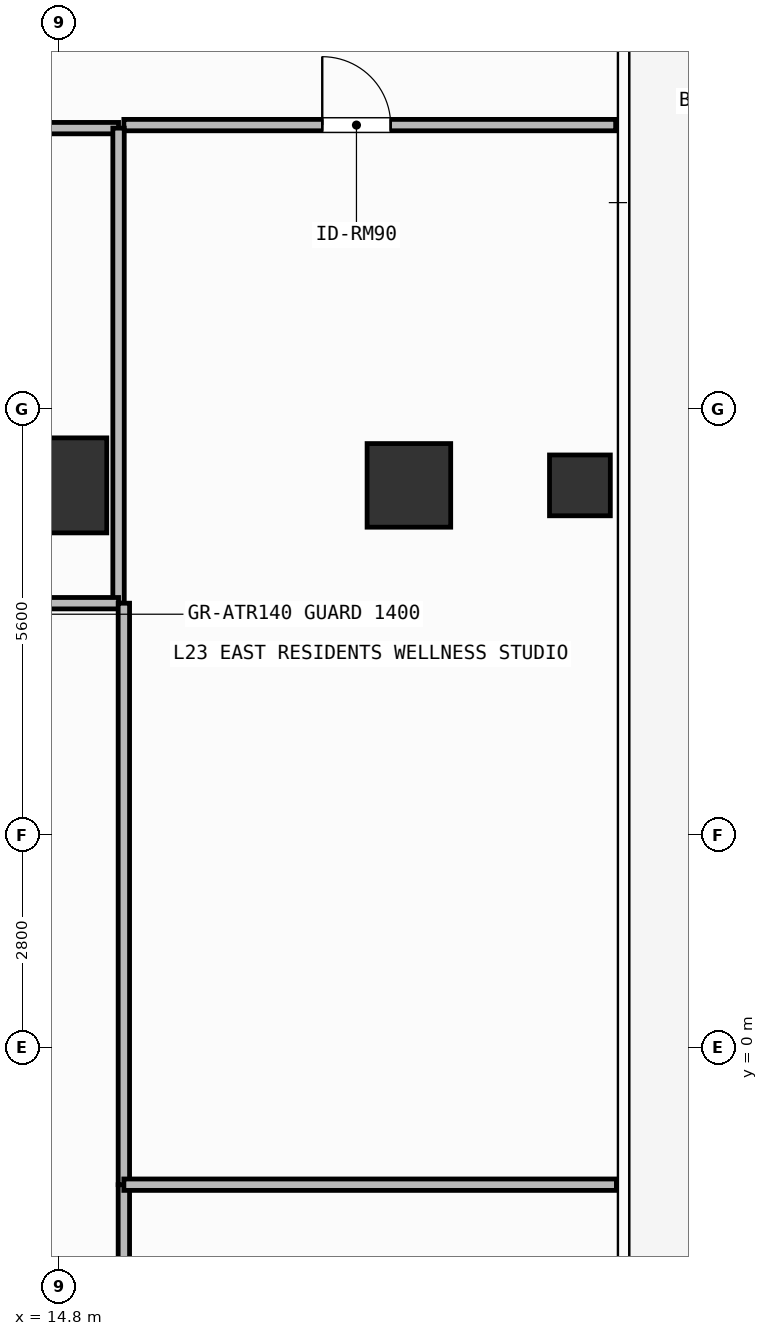
"""IFC4 building model, lengths in metres.
Left out: names, types, materials, properties, quantities, classifications, styles, units other than length and angle.
Written with IfcOpenShell. Run it as: python <this file> out.ifc"""

import sys

from ifc_helpers import new_model, si_unit, direction, frame, frame_2d, origin, origin_2d, place, context, subcontext, project, spatial, rectangle, hollow_rectangle, extrude, element, fill, save


model = new_model("IFC4")
c1 = context("Model", 3, precision=1e-05, world=origin(), true_north=direction((0.0, 1.0)))
c2 = subcontext(c1, "Body", "Model", "MODEL_VIEW")
j1 = project(units=[si_unit("LENGTHUNIT", "METRE"), si_unit("PLANEANGLEUNIT", "RADIAN")], contexts=[c1])
p1 = place(None, origin())
s1 = spatial("IfcSite", under=j1, at=p1, CompositionType="ELEMENT")
p2 = place(p1, origin())
s2 = spatial("IfcBuilding", under=s1, at=p2, CompositionType="ELEMENT")
p3 = place(p2, frame((0.0, 0.0, 93.0)))
s3 = spatial("IfcBuildingStorey", under=s2, at=p3, CompositionType="ELEMENT", Elevation=93.0)
p4 = place(p3, frame((14.8, 7.4, 0.0), z_axis=(0.0, 0.0, 1.0), x_axis=(1.0, 0.0, 0.0)))
e1 = element("IfcColumn", 1, at=p4, inside=s3, PredefinedType="COLUMN", context=c2, shape_type="SweptSolid", body=[
    extrude(rectangle(XDim=1.25, YDim=1.25, at=origin_2d()), origin(), (0.0, 0.0, 1.0), 3.9),
])
p5 = place(p3, frame((19.4, 7.4, 0.0), z_axis=(0.0, 0.0, 1.0), x_axis=(1.0, 0.0, 0.0)))
e2 = element("IfcColumn", 2, at=p5, inside=s3, PredefinedType="COLUMN", context=c2, shape_type="SweptSolid", body=[
    extrude(rectangle(XDim=1.1, YDim=1.1, at=origin_2d()), origin(), (0.0, 0.0, 1.0), 3.9),
])
p6 = place(p3, frame((21.65, 7.4, 0.0), z_axis=(0.0, 0.0, 1.0), x_axis=(1.0, 0.0, 0.0)))
e3 = element("IfcColumn", 3, at=p6, inside=s3, PredefinedType="COLUMN", context=c2, shape_type="SweptSolid", body=[
    extrude(hollow_rectangle(XDim=0.8, YDim=0.8, WallThickness=0.036, at=origin_2d()), origin(), (0.0, 0.0, 1.0), 3.9),
])
p7 = place(p3, frame((8.36, 12.1, 0.0), z_axis=(0.0, 0.0, 1.0), x_axis=(1.0, 0.0, 0.0)))
e4 = element("IfcWall", 4, at=p7, inside=s3, PredefinedType="PARTITIONING", context=c2, shape_type="SweptSolid", body=[
    extrude(rectangle(XDim=7.22, YDim=0.15, at=frame_2d((3.61, 0.0))), origin(), (0.0, 0.0, 1.0), 3.68),
])
p8 = place(p7, frame((3.513, 0.0, 0.0)))
e5 = element("IfcOpeningElement", 5, at=p8, cuts=e4, PredefinedType="OPENING", context=c2, shape_type="SweptSolid", body=[
    extrude(rectangle(XDim=0.9, YDim=2.1, at=frame_2d((0.45, 1.05))), frame((0.0, 0.085, 0.0), z_axis=(0.0, -1.0, 0.0), x_axis=(1.0, 0.0, 0.0)), (0.0, 0.0, 1.0), 0.17),
])
p9 = place(p3, frame((15.65, 12.14, 0.0), z_axis=(0.0, 0.0, 1.0), x_axis=(1.0, 0.0, 0.0)))
e6 = element("IfcWall", 6, at=p9, inside=s3, PredefinedType="PARTITIONING", context=c2, shape_type="SweptSolid", body=[
    extrude(rectangle(XDim=6.47, YDim=0.15, at=frame_2d((3.235, 0.0))), origin(), (0.0, 0.0, 1.0), 3.68),
])
p10 = place(p9, frame((2.61, 0.0, 0.0)))
e7 = element("IfcOpeningElement", 7, at=p10, cuts=e6, PredefinedType="OPENING", context=c2, shape_type="SweptSolid", body=[
    extrude(rectangle(XDim=0.9, YDim=2.1, at=frame_2d((0.45, 1.05))), frame((0.0, 0.085, 0.0), z_axis=(0.0, -1.0, 0.0), x_axis=(1.0, 0.0, 0.0)), (0.0, 0.0, 1.0), 0.17),
])
p11 = place(p3, frame((15.58, 5.85, 0.0), z_axis=(0.0, 0.0, 1.0), x_axis=(0.0, 1.0, 0.0)))
e8 = element("IfcWall", 8, at=p11, inside=s3, PredefinedType="PARTITIONING", context=c2, shape_type="SweptSolid", body=[
    extrude(rectangle(XDim=6.25, YDim=0.15, at=frame_2d((3.125, 0.0))), origin(), (0.0, 0.0, 1.0), 3.68),
])
p12 = place(p3, frame((8.96, 5.85, 0.0), z_axis=(0.0, 0.0, 1.0), x_axis=(1.0, 0.0, 0.0)))
e9 = element("IfcWall", 9, at=p12, inside=s3, PredefinedType="PARTITIONING", context=c2, shape_type="SweptSolid", body=[
    extrude(rectangle(XDim=6.62, YDim=0.15, at=frame_2d((3.31, 0.0))), origin(), (0.0, 0.0, 1.0), 3.68),
])
p13 = place(p3, frame((15.65, -5.85, 0.0), z_axis=(0.0, 0.0, 1.0), x_axis=(0.0, 1.0, 0.0)))
e10 = element("IfcWall", 10, at=p13, inside=s3, PredefinedType="PARTITIONING", context=c2, shape_type="SweptSolid", body=[
    extrude(rectangle(XDim=4.05, YDim=0.15, at=frame_2d((2.025, 0.0))), origin(), (0.0, 0.0, 1.0), 3.68),
])
p14 = place(p3, frame((15.65, -1.8, 0.0), z_axis=(0.0, 0.0, 1.0), x_axis=(0.0, 1.0, 0.0)))
e11 = element("IfcWall", 11, at=p14, inside=s3, PredefinedType="PARTITIONING", context=c2, shape_type="SweptSolid", body=[
    extrude(rectangle(XDim=7.65, YDim=0.15, at=frame_2d((3.825, 0.0))), origin(), (0.0, 0.0, 1.0), 3.68),
])
p15 = place(p3, frame((15.65, -1.8, 0.0), z_axis=(0.0, 0.0, 1.0), x_axis=(1.0, 0.0, 0.0)))
e12 = element("IfcWall", 12, at=p15, inside=s3, PredefinedType="PARTITIONING", context=c2, shape_type="SweptSolid", body=[
    extrude(rectangle(XDim=6.48, YDim=0.15, at=frame_2d((3.24, 0.0))), origin(), (0.0, 0.0, 1.0), 3.68),
])
p16 = place(p10, origin())
e13 = element("IfcDoor", 13, at=p16, inside=s3, OperationType="SINGLE_SWING_LEFT", PredefinedType="DOOR", context=c2, shape_type="SweptSolid", body=[
    extrude(rectangle(XDim=0.9, YDim=2.1, at=frame_2d((0.45, 1.05))), frame((0.0, 0.025, 0.0), z_axis=(0.0, -1.0, 0.0), x_axis=(1.0, 0.0, 0.0)), (0.0, 0.0, 1.0), 0.05),
])
fill(e7, e13)
save(model, sys.argv[1])
